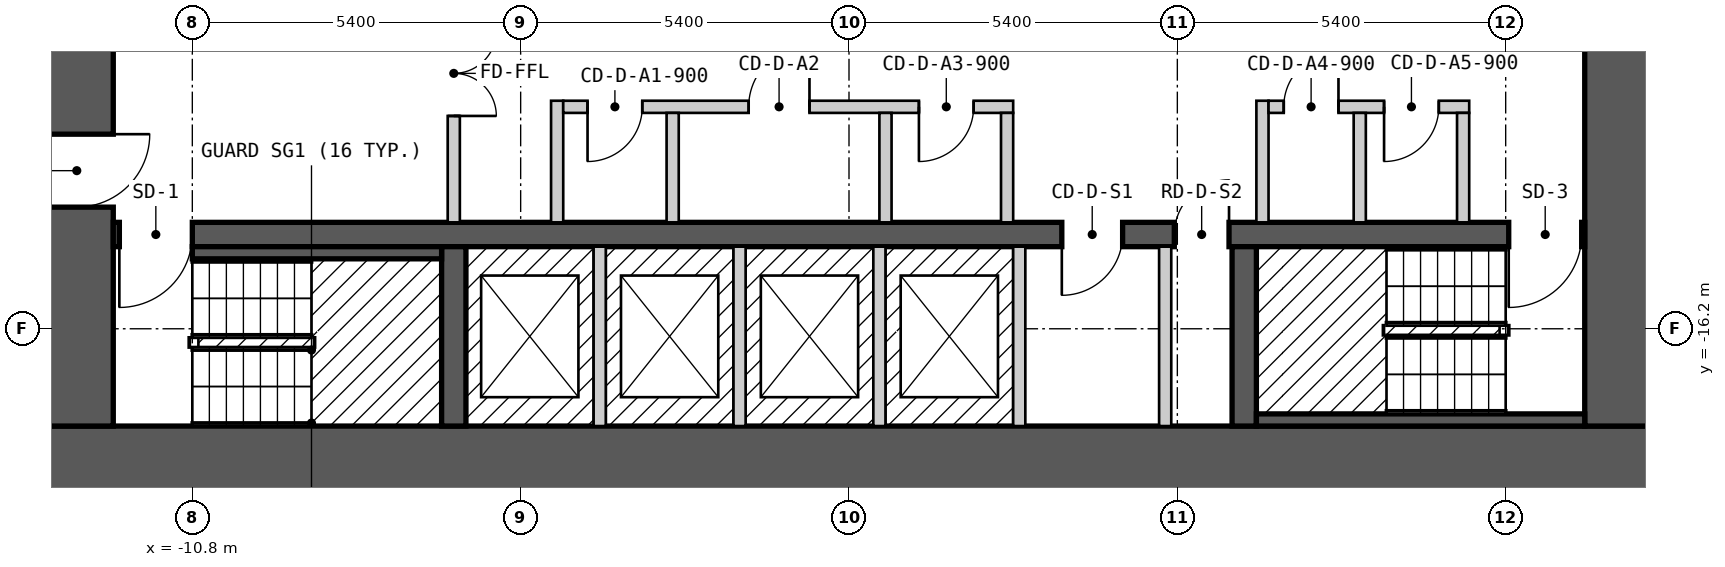
"""IFC4 building model, lengths in metres.
Left out: names, types, materials, properties, quantities, classifications, styles, units other than length and angle.
Written with IfcOpenShell. Run it as: python <this file> out.ifc"""

import sys

from ifc_helpers import new_model, si_unit, direction, frame, frame_2d, origin, place, context, subcontext, project, spatial, rectangle, extrude, element, fill, save


model = new_model("IFC4")
c1 = context("Model", 3, precision=1e-05, world=origin(), true_north=direction((0.0, 1.0)))
c2 = subcontext(c1, "Body", "Model", "MODEL_VIEW")
j1 = project(units=[si_unit("LENGTHUNIT", "METRE"), si_unit("PLANEANGLEUNIT", "RADIAN")], contexts=[c1])
p1 = place(None, origin())
s1 = spatial("IfcSite", under=j1, at=p1, CompositionType="ELEMENT")
p2 = place(p1, origin())
s2 = spatial("IfcBuilding", under=s1, at=p2, CompositionType="ELEMENT")
p3 = place(p2, frame((0.0, 0.0, 32.4)))
s3 = spatial("IfcBuildingStorey", under=s2, at=p3, CompositionType="ELEMENT", Elevation=32.4)
p4 = place(p3, frame((-13.3, -18.4, 0.0), z_axis=(0.0, 0.0, 1.0), x_axis=(1.0, 0.0, 0.0)))
e1 = element("IfcWall", 1, at=p4, inside=s3, PredefinedType="SHEAR", context=c2, shape_type="SweptSolid", body=[
    extrude(rectangle(XDim=26.6, YDim=1.2, at=frame_2d((13.3, 0.0))), origin(), (0.0, 0.0, 1.0), 2.7),
])
p5 = place(p3, frame((-12.7, -17.8, 0.0), z_axis=(0.0, 0.0, 1.0), x_axis=(0.0, 1.0, 0.0)))
e2 = element("IfcWall", 2, at=p5, inside=s3, PredefinedType="SHEAR", context=c2, shape_type="SweptSolid", body=[
    extrude(rectangle(XDim=11.6, YDim=1.2, at=frame_2d((5.8, 0.0))), origin(), (0.0, 0.0, 1.0), 2.7),
])
p6 = place(p5, frame((3.6, 0.0, 0.0)))
e3 = element("IfcOpeningElement", 3, at=p6, cuts=e2, PredefinedType="OPENING", context=c2, shape_type="SweptSolid", body=[
    extrude(rectangle(XDim=1.2, YDim=2.1, at=frame_2d((0.6, 1.05))), frame((0.0, 0.61, 0.0), z_axis=(0.0, -1.0, 0.0), x_axis=(1.0, 0.0, 0.0)), (0.0, 0.0, 1.0), 1.22),
])
p7 = place(p3, frame((12.7, -17.8, 0.0), z_axis=(0.0, 0.0, 1.0), x_axis=(0.0, 1.0, 0.0)))
e4 = element("IfcWall", 4, at=p7, inside=s3, PredefinedType="SHEAR", context=c2, shape_type="SweptSolid", body=[
    extrude(rectangle(XDim=11.6, YDim=1.2, at=frame_2d((5.8, 0.0))), origin(), (0.0, 0.0, 1.0), 2.7),
])
p8 = place(p3, frame((-12.1, -14.65, 0.0), z_axis=(0.0, 0.0, 1.0), x_axis=(1.0, 0.0, 0.0)))
e5 = element("IfcWall", 5, at=p8, inside=s3, PredefinedType="SHEAR", context=c2, shape_type="SweptSolid", body=[
    extrude(rectangle(XDim=24.2, YDim=0.4, at=frame_2d((12.1, 0.0))), origin(), (0.0, 0.0, 1.0), 2.7),
])
p9 = place(p8, frame((1.3, 0.0, 0.0), z_axis=(0.0, 0.0, 1.0), x_axis=(-1.0, 0.0, 0.0)))
e6 = element("IfcOpeningElement", 6, at=p9, cuts=e5, PredefinedType="OPENING", context=c2, shape_type="SweptSolid", body=[
    extrude(rectangle(XDim=1.2, YDim=2.1, at=frame_2d((0.6, 1.05))), frame((0.0, 0.21, 0.0), z_axis=(0.0, -1.0, 0.0), x_axis=(1.0, 0.0, 0.0)), (0.0, 0.0, 1.0), 0.42),
])
p10 = place(p8, frame((24.15, 0.0, 0.0), z_axis=(0.0, 0.0, 1.0), x_axis=(-1.0, 0.0, 0.0)))
e7 = element("IfcOpeningElement", 7, at=p10, cuts=e5, PredefinedType="OPENING", context=c2, shape_type="SweptSolid", body=[
    extrude(rectangle(XDim=1.2, YDim=2.1, at=frame_2d((0.6, 1.05))), frame((0.0, 0.21, 0.0), z_axis=(0.0, -1.0, 0.0), x_axis=(1.0, 0.0, 0.0)), (0.0, 0.0, 1.0), 0.42),
])
p11 = place(p8, frame((16.6, 0.0, 0.0), z_axis=(0.0, 0.0, 1.0), x_axis=(-1.0, 0.0, 0.0)))
e8 = element("IfcOpeningElement", 8, at=p11, cuts=e5, PredefinedType="OPENING", context=c2, shape_type="SweptSolid", body=[
    extrude(rectangle(XDim=1.0, YDim=2.1, at=frame_2d((0.5, 1.05))), frame((0.0, 0.21, 0.0), z_axis=(0.0, -1.0, 0.0), x_axis=(1.0, 0.0, 0.0)), (0.0, 0.0, 1.0), 0.42),
])
p12 = place(p8, frame((18.35, 0.0, 0.0), z_axis=(0.0, 0.0, 1.0), x_axis=(-1.0, 0.0, 0.0)))
e9 = element("IfcOpeningElement", 9, at=p12, cuts=e5, PredefinedType="OPENING", context=c2, shape_type="SweptSolid", body=[
    extrude(rectangle(XDim=0.9, YDim=2.1, at=frame_2d((0.45, 1.05))), frame((0.0, 0.21, 0.0), z_axis=(0.0, -1.0, 0.0), x_axis=(1.0, 0.0, 0.0)), (0.0, 0.0, 1.0), 0.42),
])
for number, where, z_axis, x_axis in (
    (10, (-6.5, -17.8, 0.0), (0.0, 0.0, 1.0), (0.0, 1.0, 0.0)),
    (11, (6.5, -17.8, 0.0), (0.0, 0.0, 1.0), (0.0, 1.0, 0.0)),
):
    element("IfcWall", number, at=place(p3, frame(where, z_axis=z_axis, x_axis=x_axis)), inside=s3, PredefinedType="SHEAR", context=c2, shape_type="SweptSolid", body=[
        extrude(rectangle(XDim=2.95, YDim=0.4, at=frame_2d((1.475, 0.0))), origin(), (0.0, 0.0, 1.0), 2.7),
    ])
p13 = place(p3, frame((-10.8, -14.95, 0.0), z_axis=(0.0, 0.0, 1.0), x_axis=(1.0, 0.0, 0.0)))
e12 = element("IfcWall", 12, at=p13, inside=s3, PredefinedType="SOLIDWALL", context=c2, shape_type="SweptSolid", body=[
    extrude(rectangle(XDim=4.1, YDim=0.2, at=frame_2d((2.05, 0.0))), origin(), (0.0, 0.0, 1.0), 2.7),
])
p14 = place(p3, frame((-6.5, -14.45, 0.0), z_axis=(0.0, 0.0, 1.0), x_axis=(0.0, 1.0, 0.0)))
e13 = element("IfcWall", 13, at=p14, inside=s3, PredefinedType="PARTITIONING", context=c2, shape_type="SweptSolid", body=[
    extrude(rectangle(XDim=4.9, YDim=0.2, at=frame_2d((2.45, 0.0))), origin(), (0.0, 0.0, 1.0), 2.7),
])
p15 = place(p14, frame((3.15, 0.0, 0.0), z_axis=(0.0, 0.0, 1.0), x_axis=(-1.0, 0.0, 0.0)))
e14 = element("IfcOpeningElement", 14, at=p15, cuts=e13, PredefinedType="OPENING", context=c2, shape_type="SweptSolid", body=[
    extrude(rectangle(XDim=1.4, YDim=2.1, at=frame_2d((0.7, 1.05))), frame((0.0, 0.11, 0.0), z_axis=(0.0, -1.0, 0.0), x_axis=(1.0, 0.0, 0.0)), (0.0, 0.0, 1.0), 0.22),
])
p16 = place(p3, frame((-4.8, -14.45, 0.0), z_axis=(0.0, 0.0, 1.0), x_axis=(0.0, 1.0, 0.0)))
e15 = element("IfcWall", 15, at=p16, inside=s3, PredefinedType="PARTITIONING", context=c2, shape_type="SweptSolid", body=[
    extrude(rectangle(XDim=2.0, YDim=0.2, at=frame_2d((1.0, 0.0))), origin(), (0.0, 0.0, 1.0), 2.7),
])
p17 = place(p3, frame((-4.7, -12.55, 0.0), z_axis=(0.0, 0.0, 1.0), x_axis=(1.0, 0.0, 0.0)))
e16 = element("IfcWall", 16, at=p17, inside=s3, PredefinedType="PARTITIONING", context=c2, shape_type="SweptSolid", body=[
    extrude(rectangle(XDim=7.4, YDim=0.2, at=frame_2d((3.7, 0.0))), origin(), (0.0, 0.0, 1.0), 2.7),
])
p18 = place(p17, frame((1.3, 0.0, 0.0), z_axis=(0.0, 0.0, 1.0), x_axis=(-1.0, 0.0, 0.0)))
e17 = element("IfcOpeningElement", 17, at=p18, cuts=e16, PredefinedType="OPENING", context=c2, shape_type="SweptSolid", body=[
    extrude(rectangle(XDim=0.9, YDim=2.1, at=frame_2d((0.45, 1.05))), frame((0.0, 0.11, 0.0), z_axis=(0.0, -1.0, 0.0), x_axis=(1.0, 0.0, 0.0)), (0.0, 0.0, 1.0), 0.22),
])
p19 = place(p17, frame((4.05, 0.0, 0.0), z_axis=(0.0, 0.0, 1.0), x_axis=(-1.0, 0.0, 0.0)))
e18 = element("IfcOpeningElement", 18, at=p19, cuts=e16, PredefinedType="OPENING", context=c2, shape_type="SweptSolid", body=[
    extrude(rectangle(XDim=1.0, YDim=2.1, at=frame_2d((0.5, 1.05))), frame((0.0, 0.11, 0.0), z_axis=(0.0, -1.0, 0.0), x_axis=(1.0, 0.0, 0.0)), (0.0, 0.0, 1.0), 0.22),
])
p20 = place(p17, frame((6.75, 0.0, 0.0), z_axis=(0.0, 0.0, 1.0), x_axis=(-1.0, 0.0, 0.0)))
e19 = element("IfcOpeningElement", 19, at=p20, cuts=e16, PredefinedType="OPENING", context=c2, shape_type="SweptSolid", body=[
    extrude(rectangle(XDim=0.9, YDim=2.1, at=frame_2d((0.45, 1.05))), frame((0.0, 0.11, 0.0), z_axis=(0.0, -1.0, 0.0), x_axis=(1.0, 0.0, 0.0)), (0.0, 0.0, 1.0), 0.22),
])
p21 = place(p3, frame((-4.1, -17.8, 0.0), z_axis=(0.0, 0.0, 1.0), x_axis=(0.0, 1.0, 0.0)))
e20 = element("IfcWall", 20, at=p21, inside=s3, PredefinedType="SOLIDWALL", context=c2, shape_type="SweptSolid", body=[
    extrude(rectangle(XDim=2.95, YDim=0.2, at=frame_2d((1.475, 0.0))), origin(), (0.0, 0.0, 1.0), 2.7),
])
p22 = place(p3, frame((-2.9, -14.45, 0.0), z_axis=(0.0, 0.0, 1.0), x_axis=(0.0, 1.0, 0.0)))
e21 = element("IfcWall", 21, at=p22, inside=s3, PredefinedType="PARTITIONING", context=c2, shape_type="SweptSolid", body=[
    extrude(rectangle(XDim=1.8, YDim=0.2, at=frame_2d((0.9, 0.0))), origin(), (0.0, 0.0, 1.0), 2.7),
])
for number, where, z_axis, x_axis in (
    (22, (-1.8, -17.8, 0.0), (0.0, 0.0, 1.0), (0.0, 1.0, 0.0)),
    (23, (0.5, -17.8, 0.0), (0.0, 0.0, 1.0), (0.0, 1.0, 0.0)),
):
    element("IfcWall", number, at=place(p3, frame(where, z_axis=z_axis, x_axis=x_axis)), inside=s3, PredefinedType="SOLIDWALL", context=c2, shape_type="SweptSolid", body=[
        extrude(rectangle(XDim=2.95, YDim=0.2, at=frame_2d((1.475, 0.0))), origin(), (0.0, 0.0, 1.0), 2.7),
    ])
for number, where, z_axis, x_axis in (
    (24, (0.6, -14.45, 0.0), (0.0, 0.0, 1.0), (0.0, 1.0, 0.0)),
    (25, (2.6, -14.45, 0.0), (0.0, 0.0, 1.0), (0.0, 1.0, 0.0)),
):
    element("IfcWall", number, at=place(p3, frame(where, z_axis=z_axis, x_axis=x_axis)), inside=s3, PredefinedType="PARTITIONING", context=c2, shape_type="SweptSolid", body=[
        extrude(rectangle(XDim=1.8, YDim=0.2, at=frame_2d((0.9, 0.0))), origin(), (0.0, 0.0, 1.0), 2.7),
    ])
p23 = place(p3, frame((2.8, -17.8, 0.0), z_axis=(0.0, 0.0, 1.0), x_axis=(0.0, 1.0, 0.0)))
e26 = element("IfcWall", 26, at=p23, inside=s3, PredefinedType="SOLIDWALL", context=c2, shape_type="SweptSolid", body=[
    extrude(rectangle(XDim=2.95, YDim=0.2, at=frame_2d((1.475, 0.0))), origin(), (0.0, 0.0, 1.0), 2.7),
])
p24 = place(p3, frame((5.2, -17.8, 0.0), z_axis=(0.0, 0.0, 1.0), x_axis=(0.0, 1.0, 0.0)))
e27 = element("IfcWall", 27, at=p24, inside=s3, PredefinedType="PARTITIONING", context=c2, shape_type="SweptSolid", body=[
    extrude(rectangle(XDim=2.95, YDim=0.2, at=frame_2d((1.475, 0.0))), origin(), (0.0, 0.0, 1.0), 2.7),
])
p25 = place(p3, frame((6.7, -17.7, 0.0), z_axis=(0.0, 0.0, 1.0), x_axis=(1.0, 0.0, 0.0)))
e28 = element("IfcWall", 28, at=p25, inside=s3, PredefinedType="SOLIDWALL", context=c2, shape_type="SweptSolid", body=[
    extrude(rectangle(XDim=5.4, YDim=0.2, at=frame_2d((2.7, 0.0))), origin(), (0.0, 0.0, 1.0), 2.7),
])
p26 = place(p3, frame((6.8, -14.45, 0.0), z_axis=(0.0, 0.0, 1.0), x_axis=(0.0, 1.0, 0.0)))
e29 = element("IfcWall", 29, at=p26, inside=s3, PredefinedType="PARTITIONING", context=c2, shape_type="SweptSolid", body=[
    extrude(rectangle(XDim=2.0, YDim=0.2, at=frame_2d((1.0, 0.0))), origin(), (0.0, 0.0, 1.0), 2.7),
])
p27 = place(p3, frame((6.9, -12.55, 0.0), z_axis=(0.0, 0.0, 1.0), x_axis=(1.0, 0.0, 0.0)))
e30 = element("IfcWall", 30, at=p27, inside=s3, PredefinedType="PARTITIONING", context=c2, shape_type="SweptSolid", body=[
    extrude(rectangle(XDim=3.3, YDim=0.2, at=frame_2d((1.65, 0.0))), origin(), (0.0, 0.0, 1.0), 2.7),
])
p28 = place(p27, frame((1.15, 0.0, 0.0), z_axis=(0.0, 0.0, 1.0), x_axis=(-1.0, 0.0, 0.0)))
e31 = element("IfcOpeningElement", 31, at=p28, cuts=e30, PredefinedType="OPENING", context=c2, shape_type="SweptSolid", body=[
    extrude(rectangle(XDim=0.9, YDim=2.1, at=frame_2d((0.45, 1.05))), frame((0.0, 0.11, 0.0), z_axis=(0.0, -1.0, 0.0), x_axis=(1.0, 0.0, 0.0)), (0.0, 0.0, 1.0), 0.22),
])
p29 = place(p27, frame((2.8, 0.0, 0.0), z_axis=(0.0, 0.0, 1.0), x_axis=(-1.0, 0.0, 0.0)))
e32 = element("IfcOpeningElement", 32, at=p29, cuts=e30, PredefinedType="OPENING", context=c2, shape_type="SweptSolid", body=[
    extrude(rectangle(XDim=0.9, YDim=2.1, at=frame_2d((0.45, 1.05))), frame((0.0, 0.11, 0.0), z_axis=(0.0, -1.0, 0.0), x_axis=(1.0, 0.0, 0.0)), (0.0, 0.0, 1.0), 0.22),
])
for number, where, z_axis, x_axis in (
    (33, (8.4, -14.45, 0.0), (0.0, 0.0, 1.0), (0.0, 1.0, 0.0)),
    (34, (10.1, -14.45, 0.0), (0.0, 0.0, 1.0), (0.0, 1.0, 0.0)),
):
    element("IfcWall", number, at=place(p3, frame(where, z_axis=z_axis, x_axis=x_axis)), inside=s3, PredefinedType="PARTITIONING", context=c2, shape_type="SweptSolid", body=[
        extrude(rectangle(XDim=1.8, YDim=0.2, at=frame_2d((0.9, 0.0))), origin(), (0.0, 0.0, 1.0), 2.7),
    ])
p30 = place(p9, origin())
e35 = element("IfcDoor", 35, at=p30, inside=s3, OperationType="SINGLE_SWING_RIGHT", PredefinedType="DOOR", context=c2, shape_type="SweptSolid", body=[
    extrude(rectangle(XDim=1.2, YDim=2.1, at=frame_2d((0.6, 1.05))), frame((0.0, 0.025, 0.0), z_axis=(0.0, -1.0, 0.0), x_axis=(1.0, 0.0, 0.0)), (0.0, 0.0, 1.0), 0.05),
])
fill(e6, e35)
p31 = place(p10, origin())
e36 = element("IfcDoor", 36, at=p31, inside=s3, OperationType="SINGLE_SWING_RIGHT", PredefinedType="DOOR", context=c2, shape_type="SweptSolid", body=[
    extrude(rectangle(XDim=1.2, YDim=2.1, at=frame_2d((0.6, 1.05))), frame((0.0, 0.025, 0.0), z_axis=(0.0, -1.0, 0.0), x_axis=(1.0, 0.0, 0.0)), (0.0, 0.0, 1.0), 0.05),
])
fill(e7, e36)
p32 = place(p6, origin())
e37 = element("IfcDoor", 37, at=p32, inside=s3, OperationType="SINGLE_SWING_RIGHT", PredefinedType="DOOR", context=c2, shape_type="SweptSolid", body=[
    extrude(rectangle(XDim=1.2, YDim=2.1, at=frame_2d((0.6, 1.05))), frame((0.0, 0.025, 0.0), z_axis=(0.0, -1.0, 0.0), x_axis=(1.0, 0.0, 0.0)), (0.0, 0.0, 1.0), 0.05),
])
fill(e3, e37)
p33 = place(p15, origin())
e38 = element("IfcDoor", 38, at=p33, inside=s3, OperationType="DOUBLE_DOOR_SINGLE_SWING", PredefinedType="DOOR", context=c2, shape_type="SweptSolid", body=[
    extrude(rectangle(XDim=1.4, YDim=2.1, at=frame_2d((0.7, 1.05))), frame((0.0, 0.025, 0.0), z_axis=(0.0, -1.0, 0.0), x_axis=(1.0, 0.0, 0.0)), (0.0, 0.0, 1.0), 0.05),
])
fill(e14, e38)
p34 = place(p18, origin())
e39 = element("IfcDoor", 39, at=p34, inside=s3, OperationType="SINGLE_SWING_RIGHT", PredefinedType="DOOR", context=c2, shape_type="SweptSolid", body=[
    extrude(rectangle(XDim=0.9, YDim=2.1, at=frame_2d((0.45, 1.05))), frame((0.0, 0.025, 0.0), z_axis=(0.0, -1.0, 0.0), x_axis=(1.0, 0.0, 0.0)), (0.0, 0.0, 1.0), 0.05),
])
fill(e17, e39)
p35 = place(p19, origin())
e40 = element("IfcDoor", 40, at=p35, inside=s3, OperationType="SINGLE_SWING_LEFT", PredefinedType="DOOR", context=c2, shape_type="SweptSolid", body=[
    extrude(rectangle(XDim=1.0, YDim=2.1, at=frame_2d((0.5, 1.05))), frame((0.0, 0.025, 0.0), z_axis=(0.0, -1.0, 0.0), x_axis=(1.0, 0.0, 0.0)), (0.0, 0.0, 1.0), 0.05),
])
fill(e18, e40)
p36 = place(p20, origin())
e41 = element("IfcDoor", 41, at=p36, inside=s3, OperationType="SINGLE_SWING_RIGHT", PredefinedType="DOOR", context=c2, shape_type="SweptSolid", body=[
    extrude(rectangle(XDim=0.9, YDim=2.1, at=frame_2d((0.45, 1.05))), frame((0.0, 0.025, 0.0), z_axis=(0.0, -1.0, 0.0), x_axis=(1.0, 0.0, 0.0)), (0.0, 0.0, 1.0), 0.05),
])
fill(e19, e41)
p37 = place(p28, origin())
e42 = element("IfcDoor", 42, at=p37, inside=s3, OperationType="SINGLE_SWING_LEFT", PredefinedType="DOOR", context=c2, shape_type="SweptSolid", body=[
    extrude(rectangle(XDim=0.9, YDim=2.1, at=frame_2d((0.45, 1.05))), frame((0.0, 0.025, 0.0), z_axis=(0.0, -1.0, 0.0), x_axis=(1.0, 0.0, 0.0)), (0.0, 0.0, 1.0), 0.05),
])
fill(e31, e42)
p38 = place(p29, origin())
e43 = element("IfcDoor", 43, at=p38, inside=s3, OperationType="SINGLE_SWING_RIGHT", PredefinedType="DOOR", context=c2, shape_type="SweptSolid", body=[
    extrude(rectangle(XDim=0.9, YDim=2.1, at=frame_2d((0.45, 1.05))), frame((0.0, 0.025, 0.0), z_axis=(0.0, -1.0, 0.0), x_axis=(1.0, 0.0, 0.0)), (0.0, 0.0, 1.0), 0.05),
])
fill(e32, e43)
p39 = place(p11, origin())
e44 = element("IfcDoor", 44, at=p39, inside=s3, OperationType="SINGLE_SWING_RIGHT", PredefinedType="DOOR", context=c2, shape_type="SweptSolid", body=[
    extrude(rectangle(XDim=1.0, YDim=2.1, at=frame_2d((0.5, 1.05))), frame((0.0, 0.025, 0.0), z_axis=(0.0, -1.0, 0.0), x_axis=(1.0, 0.0, 0.0)), (0.0, 0.0, 1.0), 0.05),
])
fill(e8, e44)
p40 = place(p12, origin())
e45 = element("IfcDoor", 45, at=p40, inside=s3, OperationType="SINGLE_SWING_LEFT", PredefinedType="DOOR", context=c2, shape_type="SweptSolid", body=[
    extrude(rectangle(XDim=0.9, YDim=2.1, at=frame_2d((0.45, 1.05))), frame((0.0, 0.025, 0.0), z_axis=(0.0, -1.0, 0.0), x_axis=(1.0, 0.0, 0.0)), (0.0, 0.0, 1.0), 0.05),
])
fill(e9, e45)
save(model, sys.argv[1])
